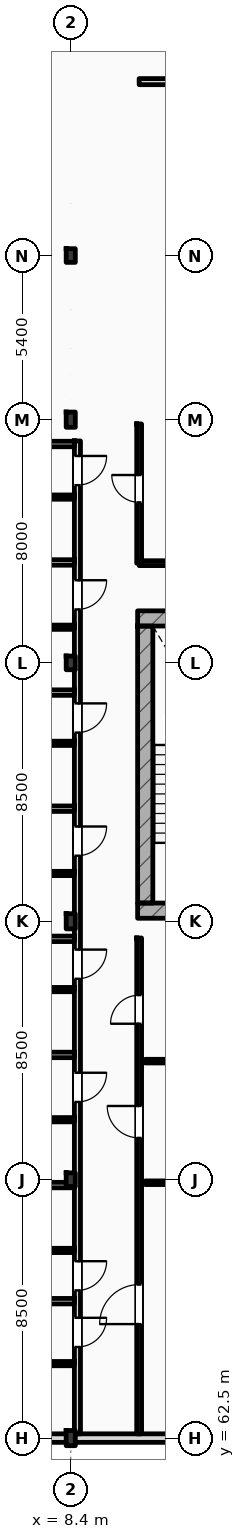
"""IFC4 building model, lengths in metres.
Left out: names, types, materials, properties, quantities, classifications, styles, units other than length and angle.
Written with IfcOpenShell. Run it as: python <this file> out.ifc"""

import sys

from ifc_helpers import new_model, si_unit, direction, frame, frame_2d, origin, origin_2d, place, context, subcontext, project, spatial, rectangle, i_section, extrude, element, fill, save


model = new_model("IFC4")
c1 = context("Model", 3, precision=1e-05, world=origin(), true_north=direction((0.0, 1.0)))
c2 = subcontext(c1, "Body", "Model", "MODEL_VIEW")
j1 = project(units=[si_unit("LENGTHUNIT", "METRE"), si_unit("PLANEANGLEUNIT", "RADIAN")], contexts=[c1])
p1 = place(None, origin())
s1 = spatial("IfcSite", under=j1, at=p1, CompositionType="ELEMENT")
p2 = place(p1, origin())
s2 = spatial("IfcBuilding", under=s1, at=p2, CompositionType="ELEMENT")
p3 = place(p2, frame((0.0, 0.0, 31.8)))
s3 = spatial("IfcBuildingStorey", under=s2, at=p3, CompositionType="ELEMENT", Elevation=31.8)
p4 = place(p3, frame((8.4, 62.5, 0.0), z_axis=(0.0, 0.0, 1.0), x_axis=(1.0, 0.0, 0.0)))
e1 = element("IfcColumn", 1, at=p4, inside=s3, PredefinedType="COLUMN", context=c2, shape_type="SweptSolid", body=[
    extrude(i_section(OverallWidth=0.3, OverallDepth=0.5, WebThickness=0.014, FlangeThickness=0.028, FilletRadius=0.027, at=origin_2d()), origin(), (0.0, 0.0, 1.0), 3.6),
])
p5 = place(p3, frame((8.4, 71.0, 0.0), z_axis=(0.0, 0.0, 1.0), x_axis=(1.0, 0.0, 0.0)))
e2 = element("IfcColumn", 2, at=p5, inside=s3, PredefinedType="COLUMN", context=c2, shape_type="SweptSolid", body=[
    extrude(i_section(OverallWidth=0.3, OverallDepth=0.45, WebThickness=0.014, FlangeThickness=0.026, FilletRadius=0.027, at=origin_2d()), origin(), (0.0, 0.0, 1.0), 3.6),
])
p6 = place(p3, frame((8.4, 79.5, 0.0), z_axis=(0.0, 0.0, 1.0), x_axis=(1.0, 0.0, 0.0)))
e3 = element("IfcColumn", 3, at=p6, inside=s3, PredefinedType="COLUMN", context=c2, shape_type="SweptSolid", body=[
    extrude(i_section(OverallWidth=0.3, OverallDepth=0.5, WebThickness=0.014, FlangeThickness=0.028, FilletRadius=0.027, at=origin_2d()), origin(), (0.0, 0.0, 1.0), 3.6),
])
p7 = place(p3, frame((8.4, 88.0, 0.0), z_axis=(0.0, 0.0, 1.0), x_axis=(1.0, 0.0, 0.0)))
e4 = element("IfcColumn", 4, at=p7, inside=s3, PredefinedType="COLUMN", context=c2, shape_type="SweptSolid", body=[
    extrude(i_section(OverallWidth=0.3, OverallDepth=0.45, WebThickness=0.014, FlangeThickness=0.026, FilletRadius=0.027, at=origin_2d()), origin(), (0.0, 0.0, 1.0), 3.6),
])
p8 = place(p3, frame((8.4, 96.0, 0.0), z_axis=(0.0, 0.0, 1.0), x_axis=(1.0, 0.0, 0.0)))
e5 = element("IfcColumn", 5, at=p8, inside=s3, PredefinedType="COLUMN", context=c2, shape_type="SweptSolid", body=[
    extrude(i_section(OverallWidth=0.3, OverallDepth=0.5, WebThickness=0.014, FlangeThickness=0.028, FilletRadius=0.027, at=origin_2d()), origin(), (0.0, 0.0, 1.0), 3.6),
])
p9 = place(p3, frame((8.4, 101.4, 0.0), z_axis=(0.0, 0.0, 1.0), x_axis=(1.0, 0.0, 0.0)))
e6 = element("IfcColumn", 6, at=p9, inside=s3, PredefinedType="COLUMN", context=c2, shape_type="SweptSolid", body=[
    extrude(i_section(OverallWidth=0.3, OverallDepth=0.45, WebThickness=0.014, FlangeThickness=0.026, FilletRadius=0.027, at=origin_2d()), origin(), (0.0, 0.0, 1.0), 3.6),
])
for number, where, z_axis, x_axis in (
    (7, (10.6, 89.462, 0.0), (0.0, 0.0, 1.0), (1.0, 0.0, 0.0)),
    (8, (10.6, 79.85, 0.0), (0.0, 0.0, 1.0), (1.0, 0.0, 0.0)),
):
    element("IfcWall", number, at=place(p3, frame(where, z_axis=z_axis, x_axis=x_axis)), inside=s3, PredefinedType="SHEAR", context=c2, shape_type="SweptSolid", body=[
        extrude(rectangle(XDim=5.16, YDim=0.5, at=frame_2d((2.58, 0.0))), origin(), (0.0, 0.0, 1.0), 3.6),
    ])
p10 = place(p3, frame((10.85, 80.1, 0.0), z_axis=(0.0, 0.0, 1.0), x_axis=(0.0, 1.0, 0.0)))
e9 = element("IfcWall", 9, at=p10, inside=s3, PredefinedType="SHEAR", context=c2, shape_type="SweptSolid", body=[
    extrude(rectangle(XDim=9.112, YDim=0.5, at=frame_2d((4.556, 0.0))), origin(), (0.0, 0.0, 1.0), 3.6),
])
p11 = place(p3, frame((0.0, 62.5, 0.0), z_axis=(0.0, 0.0, 1.0), x_axis=(1.0, 0.0, 0.0)))
e10 = element("IfcWall", 10, at=p11, inside=s3, PredefinedType="STANDARD", context=c2, shape_type="SweptSolid", body=[
    extrude(rectangle(XDim=25.2, YDim=0.28, at=frame_2d((12.6, 0.0))), origin(), (0.0, 0.0, 1.0), 2.8),
])
p12 = place(p3, frame((10.65, 107.12, 0.0), z_axis=(0.0, 0.0, 1.0), x_axis=(1.0, 0.0, 0.0)))
e11 = element("IfcWall", 11, at=p12, inside=s3, PredefinedType="PARTITIONING", context=c2, shape_type="SweptSolid", body=[
    extrude(rectangle(XDim=14.8, YDim=0.2, at=frame_2d((7.4, 0.0))), origin(), (0.0, 0.0, 1.0), 3.36),
])
p13 = place(p12, frame((8.5, 0.0, 0.0)))
e12 = element("IfcOpeningElement", 12, at=p13, cuts=e11, PredefinedType="OPENING", context=c2, shape_type="SweptSolid", body=[
    extrude(rectangle(XDim=1.25, YDim=2.15, at=frame_2d((0.625, 1.075))), frame((0.0, 0.11, 0.0), z_axis=(0.0, -1.0, 0.0), x_axis=(1.0, 0.0, 0.0)), (0.0, 0.0, 1.0), 0.22),
])
p14 = place(p3, frame((8.62, 62.64, 0.0), z_axis=(0.0, 0.0, 1.0), x_axis=(0.0, 1.0, 0.0)))
e13 = element("IfcWall", 13, at=p14, inside=s3, PredefinedType="PARTITIONING", context=c2, shape_type="SweptSolid", body=[
    extrude(rectangle(XDim=32.66, YDim=0.2, at=frame_2d((16.33, 0.0))), origin(), (0.0, 0.0, 1.0), 2.99),
])
p15 = place(p14, frame((2.857, 0.0, 0.0)))
e14 = element("IfcOpeningElement", 14, at=p15, cuts=e13, PredefinedType="OPENING", context=c2, shape_type="SweptSolid", body=[
    extrude(rectangle(XDim=0.96, YDim=2.2, at=frame_2d((0.48, 1.1))), frame((0.0, 0.11, 0.0), z_axis=(0.0, -1.0, 0.0), x_axis=(1.0, 0.0, 0.0)), (0.0, 0.0, 1.0), 0.22),
])
p16 = place(p14, frame((4.719, 0.0, 0.0)))
e15 = element("IfcOpeningElement", 15, at=p16, cuts=e13, PredefinedType="OPENING", context=c2, shape_type="SweptSolid", body=[
    extrude(rectangle(XDim=0.96, YDim=2.2, at=frame_2d((0.48, 1.1))), frame((0.0, 0.11, 0.0), z_axis=(0.0, -1.0, 0.0), x_axis=(1.0, 0.0, 0.0)), (0.0, 0.0, 1.0), 0.22),
])
p17 = place(p14, frame((10.918, 0.0, 0.0)))
e16 = element("IfcOpeningElement", 16, at=p17, cuts=e13, PredefinedType="OPENING", context=c2, shape_type="SweptSolid", body=[
    extrude(rectangle(XDim=0.96, YDim=2.2, at=frame_2d((0.48, 1.1))), frame((0.0, 0.11, 0.0), z_axis=(0.0, -1.0, 0.0), x_axis=(1.0, 0.0, 0.0)), (0.0, 0.0, 1.0), 0.22),
])
p18 = place(p14, frame((14.969, 0.0, 0.0)))
e17 = element("IfcOpeningElement", 17, at=p18, cuts=e13, PredefinedType="OPENING", context=c2, shape_type="SweptSolid", body=[
    extrude(rectangle(XDim=0.96, YDim=2.2, at=frame_2d((0.48, 1.1))), frame((0.0, 0.11, 0.0), z_axis=(0.0, -1.0, 0.0), x_axis=(1.0, 0.0, 0.0)), (0.0, 0.0, 1.0), 0.22),
])
p19 = place(p14, frame((19.018, 0.0, 0.0)))
e18 = element("IfcOpeningElement", 18, at=p19, cuts=e13, PredefinedType="OPENING", context=c2, shape_type="SweptSolid", body=[
    extrude(rectangle(XDim=0.96, YDim=2.2, at=frame_2d((0.48, 1.1))), frame((0.0, 0.11, 0.0), z_axis=(0.0, -1.0, 0.0), x_axis=(1.0, 0.0, 0.0)), (0.0, 0.0, 1.0), 0.22),
])
p20 = place(p14, frame((23.068, 0.0, 0.0)))
e19 = element("IfcOpeningElement", 19, at=p20, cuts=e13, PredefinedType="OPENING", context=c2, shape_type="SweptSolid", body=[
    extrude(rectangle(XDim=0.96, YDim=2.2, at=frame_2d((0.48, 1.1))), frame((0.0, 0.11, 0.0), z_axis=(0.0, -1.0, 0.0), x_axis=(1.0, 0.0, 0.0)), (0.0, 0.0, 1.0), 0.22),
])
p21 = place(p14, frame((27.119, 0.0, 0.0)))
e20 = element("IfcOpeningElement", 20, at=p21, cuts=e13, PredefinedType="OPENING", context=c2, shape_type="SweptSolid", body=[
    extrude(rectangle(XDim=0.96, YDim=2.2, at=frame_2d((0.48, 1.1))), frame((0.0, 0.11, 0.0), z_axis=(0.0, -1.0, 0.0), x_axis=(1.0, 0.0, 0.0)), (0.0, 0.0, 1.0), 0.22),
])
p22 = place(p14, frame((31.207, 0.0, 0.0)))
e21 = element("IfcOpeningElement", 21, at=p22, cuts=e13, PredefinedType="OPENING", context=c2, shape_type="SweptSolid", body=[
    extrude(rectangle(XDim=0.96, YDim=2.2, at=frame_2d((0.48, 1.1))), frame((0.0, 0.11, 0.0), z_axis=(0.0, -1.0, 0.0), x_axis=(1.0, 0.0, 0.0)), (0.0, 0.0, 1.0), 0.22),
])
p23 = place(p3, frame((10.65, 62.64, 0.0), z_axis=(0.0, 0.0, 1.0), x_axis=(0.0, 1.0, 0.0)))
e22 = element("IfcWall", 22, at=p23, inside=s3, PredefinedType="PARTITIONING", context=c2, shape_type="SweptSolid", body=[
    extrude(rectangle(XDim=16.31, YDim=0.16, at=frame_2d((8.155, 0.0))), origin(), (0.0, 0.0, 1.0), 3.36),
])
p24 = place(p23, frame((3.61, 0.0, 0.0)))
e23 = element("IfcOpeningElement", 23, at=p24, cuts=e22, PredefinedType="OPENING", context=c2, shape_type="SweptSolid", body=[
    extrude(rectangle(XDim=1.3, YDim=2.2, at=frame_2d((0.65, 1.1))), frame((0.0, 0.09, 0.0), z_axis=(0.0, -1.0, 0.0), x_axis=(1.0, 0.0, 0.0)), (0.0, 0.0, 1.0), 0.18),
])
p25 = place(p23, frame((9.735, 0.0, 0.0)))
e24 = element("IfcOpeningElement", 24, at=p25, cuts=e22, PredefinedType="OPENING", context=c2, shape_type="SweptSolid", body=[
    extrude(rectangle(XDim=1.05, YDim=2.12, at=frame_2d((0.525, 1.06))), frame((0.0, 0.09, 0.0), z_axis=(0.0, -1.0, 0.0), x_axis=(1.0, 0.0, 0.0)), (0.0, 0.0, 1.0), 0.18),
])
p26 = place(p23, frame((13.49, 0.0, 0.0)))
e25 = element("IfcOpeningElement", 25, at=p26, cuts=e22, PredefinedType="OPENING", context=c2, shape_type="SweptSolid", body=[
    extrude(rectangle(XDim=0.94, YDim=2.15, at=frame_2d((0.47, 1.075))), frame((0.0, 0.09, 0.0), z_axis=(0.0, -1.0, 0.0), x_axis=(1.0, 0.0, 0.0)), (0.0, 0.0, 1.0), 0.18),
])
p27 = place(p3, frame((10.65, 91.28, 0.0), z_axis=(0.0, 0.0, 1.0), x_axis=(0.0, 1.0, 0.0)))
e26 = element("IfcWall", 26, at=p27, inside=s3, PredefinedType="PARTITIONING", context=c2, shape_type="SweptSolid", body=[
    extrude(rectangle(XDim=4.58, YDim=0.16, at=frame_2d((2.29, 0.0))), origin(), (0.0, 0.0, 1.0), 3.36),
])
p28 = place(p27, frame((2.0, 0.0, 0.0)))
e27 = element("IfcOpeningElement", 27, at=p28, cuts=e26, PredefinedType="OPENING", context=c2, shape_type="SweptSolid", body=[
    extrude(rectangle(XDim=0.9, YDim=2.1, at=frame_2d((0.45, 1.05))), frame((0.0, 0.09, 0.0), z_axis=(0.0, -1.0, 0.0), x_axis=(1.0, 0.0, 0.0)), (0.0, 0.0, 1.0), 0.18),
])
p29 = place(p3, frame((10.65, 91.28, 0.0), z_axis=(0.0, 0.0, 1.0), x_axis=(1.0, 0.0, 0.0)))
e28 = element("IfcWall", 28, at=p29, inside=s3, PredefinedType="PARTITIONING", context=c2, shape_type="SweptSolid", body=[
    extrude(rectangle(XDim=6.9, YDim=0.16, at=frame_2d((3.45, 0.0))), origin(), (0.0, 0.0, 1.0), 3.36),
])
p30 = place(p3, frame((0.15, 67.004, 0.0), z_axis=(0.0, 0.0, 1.0), x_axis=(1.0, 0.0, 0.0)))
e29 = element("IfcWall", 29, at=p30, inside=s3, PredefinedType="PARTITIONING", context=c2, shape_type="SweptSolid", body=[
    extrude(rectangle(XDim=8.37, YDim=0.18, at=frame_2d((4.185, 0.0))), origin(), (0.0, 0.0, 1.0), 3.36),
])
p31 = place(p3, frame((5.05, 64.95, 0.0), z_axis=(0.0, 0.0, 1.0), x_axis=(1.0, 0.0, 0.0)))
e30 = element("IfcWall", 30, at=p31, inside=s3, PredefinedType="PARTITIONING", context=c2, shape_type="SweptSolid", body=[
    extrude(rectangle(XDim=3.47, YDim=0.14, at=frame_2d((1.735, 0.0))), origin(), (0.0, 0.0, 1.0), 3.36),
])
p32 = place(p3, frame((0.15, 70.823, 0.0), z_axis=(0.0, 0.0, 1.0), x_axis=(1.0, 0.0, 0.0)))
e31 = element("IfcWall", 31, at=p32, inside=s3, PredefinedType="PARTITIONING", context=c2, shape_type="SweptSolid", body=[
    extrude(rectangle(XDim=8.37, YDim=0.18, at=frame_2d((4.185, 0.0))), origin(), (0.0, 0.0, 1.0), 2.8),
])
p33 = place(p3, frame((5.05, 68.673, 0.0), z_axis=(0.0, 0.0, 1.0), x_axis=(1.0, 0.0, 0.0)))
e32 = element("IfcWall", 32, at=p33, inside=s3, PredefinedType="PARTITIONING", context=c2, shape_type="SweptSolid", body=[
    extrude(rectangle(XDim=3.47, YDim=0.14, at=frame_2d((1.735, 0.0))), origin(), (0.0, 0.0, 1.0), 3.36),
])
p34 = place(p3, frame((0.15, 75.104, 0.0), z_axis=(0.0, 0.0, 1.0), x_axis=(1.0, 0.0, 0.0)))
e33 = element("IfcWall", 33, at=p34, inside=s3, PredefinedType="PARTITIONING", context=c2, shape_type="SweptSolid", body=[
    extrude(rectangle(XDim=8.37, YDim=0.18, at=frame_2d((4.185, 0.0))), origin(), (0.0, 0.0, 1.0), 3.36),
])
p35 = place(p3, frame((5.05, 72.973, 0.0), z_axis=(0.0, 0.0, 1.0), x_axis=(1.0, 0.0, 0.0)))
e34 = element("IfcWall", 34, at=p35, inside=s3, PredefinedType="PARTITIONING", context=c2, shape_type="SweptSolid", body=[
    extrude(rectangle(XDim=3.47, YDim=0.14, at=frame_2d((1.735, 0.0))), origin(), (0.0, 0.0, 1.0), 3.36),
])
p36 = place(p3, frame((0.15, 78.923, 0.0), z_axis=(0.0, 0.0, 1.0), x_axis=(1.0, 0.0, 0.0)))
e35 = element("IfcWall", 35, at=p36, inside=s3, PredefinedType="PARTITIONING", context=c2, shape_type="SweptSolid", body=[
    extrude(rectangle(XDim=8.37, YDim=0.18, at=frame_2d((4.185, 0.0))), origin(), (0.0, 0.0, 1.0), 3.36),
])
p37 = place(p3, frame((5.05, 77.254, 0.0), z_axis=(0.0, 0.0, 1.0), x_axis=(1.0, 0.0, 0.0)))
e36 = element("IfcWall", 36, at=p37, inside=s3, PredefinedType="PARTITIONING", context=c2, shape_type="SweptSolid", body=[
    extrude(rectangle(XDim=3.47, YDim=0.14, at=frame_2d((1.735, 0.0))), origin(), (0.0, 0.0, 1.0), 3.36),
])
p38 = place(p3, frame((0.15, 83.204, 0.0), z_axis=(0.0, 0.0, 1.0), x_axis=(1.0, 0.0, 0.0)))
e37 = element("IfcWall", 37, at=p38, inside=s3, PredefinedType="PARTITIONING", context=c2, shape_type="SweptSolid", body=[
    extrude(rectangle(XDim=8.37, YDim=0.18, at=frame_2d((4.185, 0.0))), origin(), (0.0, 0.0, 1.0), 3.36),
])
p39 = place(p3, frame((5.05, 81.073, 0.0), z_axis=(0.0, 0.0, 1.0), x_axis=(1.0, 0.0, 0.0)))
e38 = element("IfcWall", 38, at=p39, inside=s3, PredefinedType="PARTITIONING", context=c2, shape_type="SweptSolid", body=[
    extrude(rectangle(XDim=3.47, YDim=0.14, at=frame_2d((1.735, 0.0))), origin(), (0.0, 0.0, 1.0), 3.36),
])
p40 = place(p3, frame((0.15, 87.023, 0.0), z_axis=(0.0, 0.0, 1.0), x_axis=(1.0, 0.0, 0.0)))
e39 = element("IfcWall", 39, at=p40, inside=s3, PredefinedType="PARTITIONING", context=c2, shape_type="SweptSolid", body=[
    extrude(rectangle(XDim=8.37, YDim=0.18, at=frame_2d((4.185, 0.0))), origin(), (0.0, 0.0, 1.0), 3.36),
])
p41 = place(p3, frame((5.05, 85.354, 0.0), z_axis=(0.0, 0.0, 1.0), x_axis=(1.0, 0.0, 0.0)))
e40 = element("IfcWall", 40, at=p41, inside=s3, PredefinedType="PARTITIONING", context=c2, shape_type="SweptSolid", body=[
    extrude(rectangle(XDim=3.47, YDim=0.14, at=frame_2d((1.735, 0.0))), origin(), (0.0, 0.0, 1.0), 3.36),
])
p42 = place(p3, frame((0.15, 91.304, 0.0), z_axis=(0.0, 0.0, 1.0), x_axis=(1.0, 0.0, 0.0)))
e41 = element("IfcWall", 41, at=p42, inside=s3, PredefinedType="PARTITIONING", context=c2, shape_type="SweptSolid", body=[
    extrude(rectangle(XDim=8.37, YDim=0.18, at=frame_2d((4.185, 0.0))), origin(), (0.0, 0.0, 1.0), 3.36),
])
p43 = place(p3, frame((5.05, 89.173, 0.0), z_axis=(0.0, 0.0, 1.0), x_axis=(1.0, 0.0, 0.0)))
e42 = element("IfcWall", 42, at=p43, inside=s3, PredefinedType="PARTITIONING", context=c2, shape_type="SweptSolid", body=[
    extrude(rectangle(XDim=3.47, YDim=0.14, at=frame_2d((1.735, 0.0))), origin(), (0.0, 0.0, 1.0), 3.36),
])
p44 = place(p3, frame((0.15, 95.2, 0.0), z_axis=(0.0, 0.0, 1.0), x_axis=(1.0, 0.0, 0.0)))
e43 = element("IfcWall", 43, at=p44, inside=s3, PredefinedType="PARTITIONING", context=c2, shape_type="SweptSolid", body=[
    extrude(rectangle(XDim=8.37, YDim=0.18, at=frame_2d((4.185, 0.0))), origin(), (0.0, 0.0, 1.0), 3.36),
])
p45 = place(p3, frame((5.05, 93.454, 0.0), z_axis=(0.0, 0.0, 1.0), x_axis=(1.0, 0.0, 0.0)))
e44 = element("IfcWall", 44, at=p45, inside=s3, PredefinedType="PARTITIONING", context=c2, shape_type="SweptSolid", body=[
    extrude(rectangle(XDim=3.47, YDim=0.14, at=frame_2d((1.735, 0.0))), origin(), (0.0, 0.0, 1.0), 3.36),
])
p46 = place(p3, frame((10.85, 70.9, 0.0), z_axis=(0.0, 0.0, 1.0), x_axis=(1.0, 0.0, 0.0)))
e45 = element("IfcWall", 45, at=p46, inside=s3, PredefinedType="PARTITIONING", context=c2, shape_type="SweptSolid", body=[
    extrude(rectangle(XDim=7.35, YDim=0.12, at=frame_2d((3.675, 0.0))), origin(), (0.0, 0.0, 1.0), 2.8),
])
p47 = place(p3, frame((10.85, 74.9, 0.0), z_axis=(0.0, 0.0, 1.0), x_axis=(1.0, 0.0, 0.0)))
e46 = element("IfcWall", 46, at=p47, inside=s3, PredefinedType="PARTITIONING", context=c2, shape_type="SweptSolid", body=[
    extrude(rectangle(XDim=5.35, YDim=0.12, at=frame_2d((2.675, 0.0))), origin(), (0.0, 0.0, 1.0), 3.36),
])
p48 = place(p15, frame((0.96, 0.0, 0.0), z_axis=(0.0, 0.0, 1.0), x_axis=(-1.0, 0.0, 0.0)))
e47 = element("IfcDoor", 47, at=p48, inside=s3, OperationType="SINGLE_SWING_RIGHT", PredefinedType="DOOR", context=c2, shape_type="SweptSolid", body=[
    extrude(rectangle(XDim=0.96, YDim=2.2, at=frame_2d((0.48, 1.1))), frame((0.0, 0.025, 0.0), z_axis=(0.0, -1.0, 0.0), x_axis=(1.0, 0.0, 0.0)), (0.0, 0.0, 1.0), 0.05),
])
fill(e14, e47)
p49 = place(p16, frame((0.96, 0.0, 0.0), z_axis=(0.0, 0.0, 1.0), x_axis=(-1.0, 0.0, 0.0)))
e48 = element("IfcDoor", 48, at=p49, inside=s3, OperationType="SINGLE_SWING_RIGHT", PredefinedType="DOOR", context=c2, shape_type="SweptSolid", body=[
    extrude(rectangle(XDim=0.96, YDim=2.2, at=frame_2d((0.48, 1.1))), frame((0.0, 0.025, 0.0), z_axis=(0.0, -1.0, 0.0), x_axis=(1.0, 0.0, 0.0)), (0.0, 0.0, 1.0), 0.05),
])
fill(e15, e48)
p50 = place(p17, frame((0.96, 0.0, 0.0), z_axis=(0.0, 0.0, 1.0), x_axis=(-1.0, 0.0, 0.0)))
e49 = element("IfcDoor", 49, at=p50, inside=s3, OperationType="SINGLE_SWING_RIGHT", PredefinedType="DOOR", context=c2, shape_type="SweptSolid", body=[
    extrude(rectangle(XDim=0.96, YDim=2.2, at=frame_2d((0.48, 1.1))), frame((0.0, 0.025, 0.0), z_axis=(0.0, -1.0, 0.0), x_axis=(1.0, 0.0, 0.0)), (0.0, 0.0, 1.0), 0.05),
])
fill(e16, e49)
p51 = place(p18, frame((0.96, 0.0, 0.0), z_axis=(0.0, 0.0, 1.0), x_axis=(-1.0, 0.0, 0.0)))
e50 = element("IfcDoor", 50, at=p51, inside=s3, OperationType="SINGLE_SWING_RIGHT", PredefinedType="DOOR", context=c2, shape_type="SweptSolid", body=[
    extrude(rectangle(XDim=0.96, YDim=2.2, at=frame_2d((0.48, 1.1))), frame((0.0, 0.025, 0.0), z_axis=(0.0, -1.0, 0.0), x_axis=(1.0, 0.0, 0.0)), (0.0, 0.0, 1.0), 0.05),
])
fill(e17, e50)
p52 = place(p19, frame((0.96, 0.0, 0.0), z_axis=(0.0, 0.0, 1.0), x_axis=(-1.0, 0.0, 0.0)))
e51 = element("IfcDoor", 51, at=p52, inside=s3, OperationType="SINGLE_SWING_RIGHT", PredefinedType="DOOR", context=c2, shape_type="SweptSolid", body=[
    extrude(rectangle(XDim=0.96, YDim=2.2, at=frame_2d((0.48, 1.1))), frame((0.0, 0.025, 0.0), z_axis=(0.0, -1.0, 0.0), x_axis=(1.0, 0.0, 0.0)), (0.0, 0.0, 1.0), 0.05),
])
fill(e18, e51)
p53 = place(p20, frame((0.96, 0.0, 0.0), z_axis=(0.0, 0.0, 1.0), x_axis=(-1.0, 0.0, 0.0)))
e52 = element("IfcDoor", 52, at=p53, inside=s3, OperationType="SINGLE_SWING_RIGHT", PredefinedType="DOOR", context=c2, shape_type="SweptSolid", body=[
    extrude(rectangle(XDim=0.96, YDim=2.2, at=frame_2d((0.48, 1.1))), frame((0.0, 0.025, 0.0), z_axis=(0.0, -1.0, 0.0), x_axis=(1.0, 0.0, 0.0)), (0.0, 0.0, 1.0), 0.05),
])
fill(e19, e52)
p54 = place(p21, frame((0.96, 0.0, 0.0), z_axis=(0.0, 0.0, 1.0), x_axis=(-1.0, 0.0, 0.0)))
e53 = element("IfcDoor", 53, at=p54, inside=s3, OperationType="SINGLE_SWING_RIGHT", PredefinedType="DOOR", context=c2, shape_type="SweptSolid", body=[
    extrude(rectangle(XDim=0.96, YDim=2.2, at=frame_2d((0.48, 1.1))), frame((0.0, 0.025, 0.0), z_axis=(0.0, -1.0, 0.0), x_axis=(1.0, 0.0, 0.0)), (0.0, 0.0, 1.0), 0.05),
])
fill(e20, e53)
p55 = place(p22, frame((0.96, 0.0, 0.0), z_axis=(0.0, 0.0, 1.0), x_axis=(-1.0, 0.0, 0.0)))
e54 = element("IfcDoor", 54, at=p55, inside=s3, OperationType="SINGLE_SWING_RIGHT", PredefinedType="DOOR", context=c2, shape_type="SweptSolid", body=[
    extrude(rectangle(XDim=0.96, YDim=2.2, at=frame_2d((0.48, 1.1))), frame((0.0, 0.025, 0.0), z_axis=(0.0, -1.0, 0.0), x_axis=(1.0, 0.0, 0.0)), (0.0, 0.0, 1.0), 0.05),
])
fill(e21, e54)
p56 = place(p24, origin())
e55 = element("IfcDoor", 55, at=p56, inside=s3, OperationType="SINGLE_SWING_LEFT", PredefinedType="DOOR", context=c2, shape_type="SweptSolid", body=[
    extrude(rectangle(XDim=1.3, YDim=2.2, at=frame_2d((0.65, 1.1))), frame((0.0, 0.025, 0.0), z_axis=(0.0, -1.0, 0.0), x_axis=(1.0, 0.0, 0.0)), (0.0, 0.0, 1.0), 0.05),
])
fill(e23, e55)
p57 = place(p25, origin())
e56 = element("IfcDoor", 56, at=p57, inside=s3, OperationType="SINGLE_SWING_RIGHT", PredefinedType="DOOR", context=c2, shape_type="SweptSolid", body=[
    extrude(rectangle(XDim=1.05, YDim=2.12, at=frame_2d((0.525, 1.06))), frame((0.0, 0.025, 0.0), z_axis=(0.0, -1.0, 0.0), x_axis=(1.0, 0.0, 0.0)), (0.0, 0.0, 1.0), 0.05),
])
fill(e24, e56)
p58 = place(p26, origin())
e57 = element("IfcDoor", 57, at=p58, inside=s3, OperationType="SINGLE_SWING_LEFT", PredefinedType="DOOR", context=c2, shape_type="SweptSolid", body=[
    extrude(rectangle(XDim=0.94, YDim=2.15, at=frame_2d((0.47, 1.075))), frame((0.0, 0.025, 0.0), z_axis=(0.0, -1.0, 0.0), x_axis=(1.0, 0.0, 0.0)), (0.0, 0.0, 1.0), 0.05),
])
fill(e25, e57)
p59 = place(p28, origin())
e58 = element("IfcDoor", 58, at=p59, inside=s3, OperationType="SINGLE_SWING_RIGHT", PredefinedType="DOOR", context=c2, shape_type="SweptSolid", body=[
    extrude(rectangle(XDim=0.9, YDim=2.1, at=frame_2d((0.45, 1.05))), frame((0.0, 0.025, 0.0), z_axis=(0.0, -1.0, 0.0), x_axis=(1.0, 0.0, 0.0)), (0.0, 0.0, 1.0), 0.05),
])
fill(e27, e58)
save(model, sys.argv[1])
